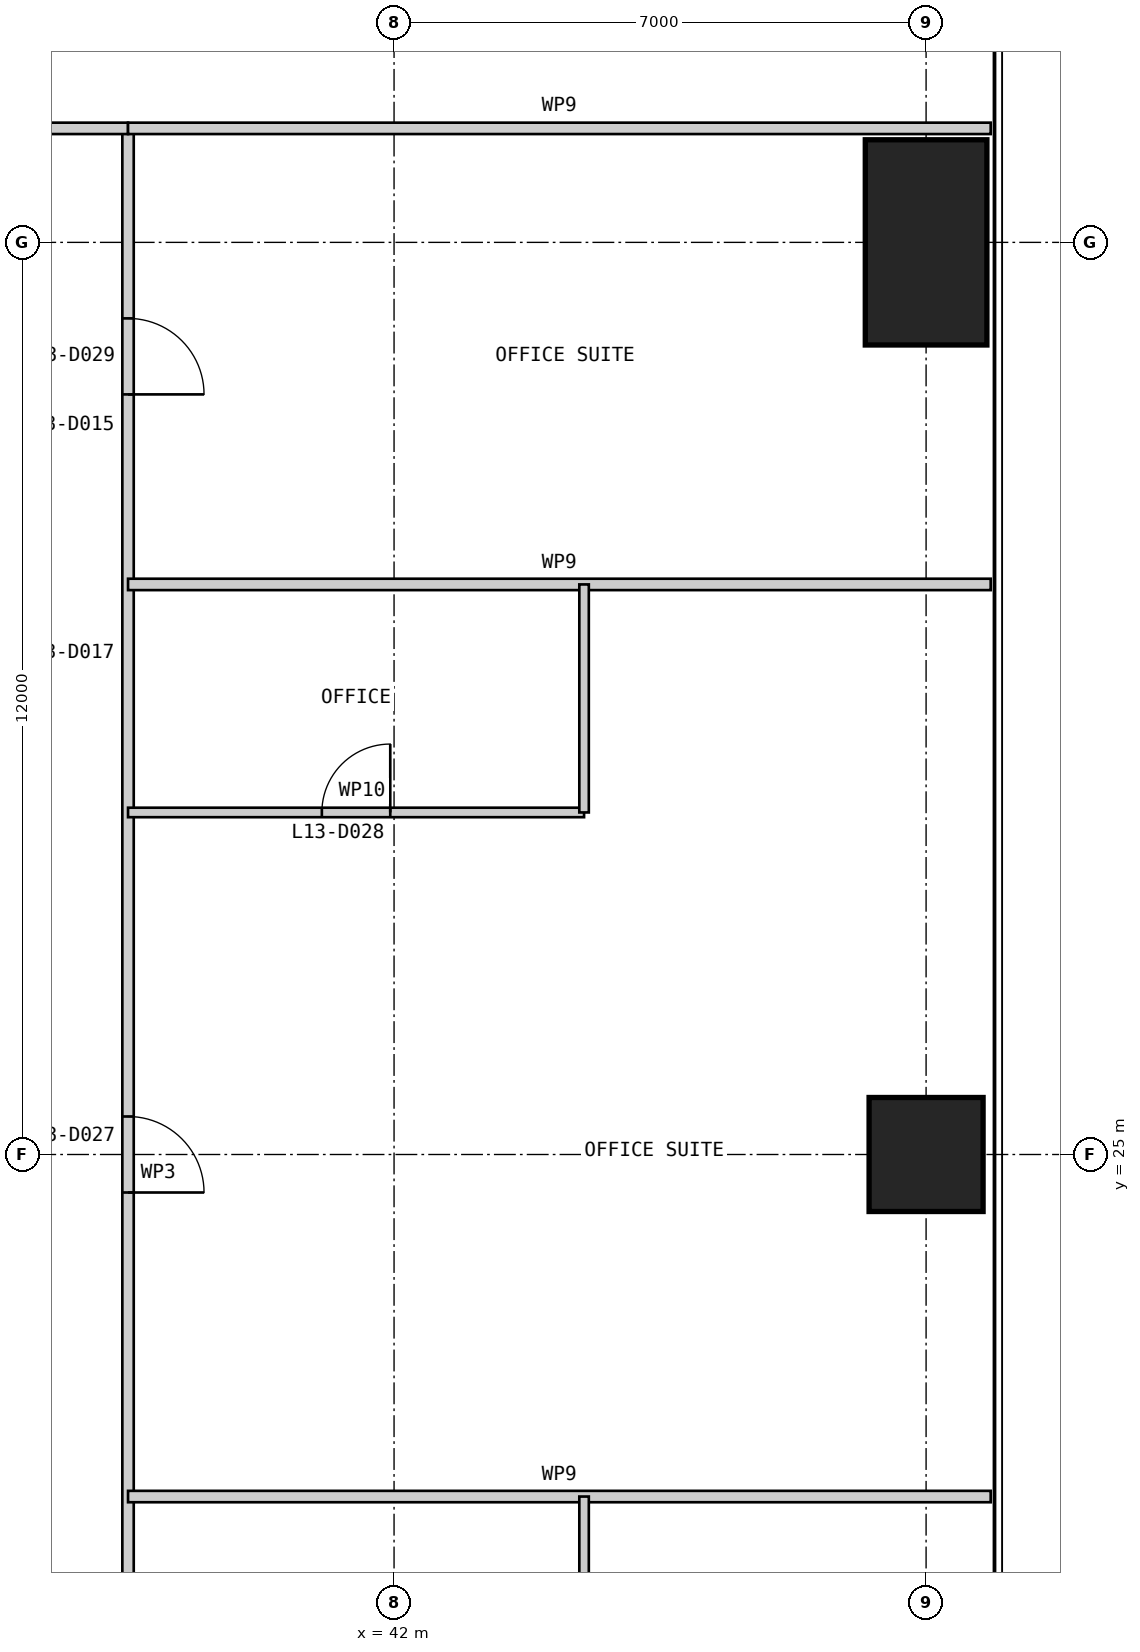
"""IFC4 building model, lengths in metres.
Left out: names, types, materials, properties, quantities, classifications, styles, units other than length and angle.
Written with IfcOpenShell. Run it as: python <this file> out.ifc"""

import sys

from ifc_helpers import new_model, si_unit, direction, frame, frame_2d, origin, origin_2d, place, context, subcontext, project, spatial, rectangle, extrude, element, fill, save


model = new_model("IFC4")
c1 = context("Model", 3, precision=1e-05, world=origin(), true_north=direction((0.0, 1.0)))
c2 = subcontext(c1, "Body", "Model", "MODEL_VIEW")
j1 = project(units=[si_unit("LENGTHUNIT", "METRE"), si_unit("PLANEANGLEUNIT", "RADIAN")], contexts=[c1])
p1 = place(None, origin())
s1 = spatial("IfcSite", under=j1, at=p1, CompositionType="ELEMENT")
p2 = place(p1, origin())
s2 = spatial("IfcBuilding", under=s1, at=p2, CompositionType="ELEMENT")
p3 = place(p2, frame((0.0, 0.0, 59.0)))
s3 = spatial("IfcBuildingStorey", under=s2, at=p3, CompositionType="ELEMENT", Elevation=59.0)
p4 = place(p3, frame((49.0, 25.0, 0.0), z_axis=(0.0, 0.0, 1.0), x_axis=(1.0, 0.0, 0.0)))
e1 = element("IfcColumn", 1, at=p4, inside=s3, PredefinedType="COLUMN", context=c2, shape_type="SweptSolid", body=[
    extrude(rectangle(XDim=1.5, YDim=1.5, at=origin_2d()), origin(), (0.0, 0.0, 1.0), 4.0),
])
p5 = place(p3, frame((49.0, 37.0, 0.0), z_axis=(0.0, 0.0, 1.0), x_axis=(1.0, 0.0, 0.0)))
e2 = element("IfcColumn", 2, at=p5, inside=s3, PredefinedType="COLUMN", context=c2, shape_type="SweptSolid", body=[
    extrude(rectangle(XDim=1.6, YDim=2.7, at=origin_2d()), origin(), (0.0, 0.0, 1.0), 4.0),
])
p6 = place(p3, frame((38.5, 11.5, 0.0), z_axis=(0.0, 0.0, 1.0), x_axis=(0.0, 1.0, 0.0)))
e3 = element("IfcWall", 3, at=p6, inside=s3, PredefinedType="PARTITIONING", context=c2, shape_type="SweptSolid", body=[
    extrude(rectangle(XDim=27.0, YDim=0.15, at=frame_2d((13.5, 0.0))), origin(), (0.0, 0.0, 1.0), 3.85),
])
p7 = place(p6, frame((2.5, 0.0, 0.0)))
e4 = element("IfcOpeningElement", 4, at=p7, cuts=e3, PredefinedType="OPENING", context=c2, shape_type="SweptSolid", body=[
    extrude(rectangle(XDim=1.0, YDim=2.2, at=frame_2d((0.5, 1.1))), frame((0.0, 0.085, 0.0), z_axis=(0.0, -1.0, 0.0), x_axis=(1.0, 0.0, 0.0)), (0.0, 0.0, 1.0), 0.17),
])
p8 = place(p6, frame((13.0, 0.0, 0.0)))
e5 = element("IfcOpeningElement", 5, at=p8, cuts=e3, PredefinedType="OPENING", context=c2, shape_type="SweptSolid", body=[
    extrude(rectangle(XDim=1.0, YDim=2.2, at=frame_2d((0.5, 1.1))), frame((0.0, 0.085, 0.0), z_axis=(0.0, -1.0, 0.0), x_axis=(1.0, 0.0, 0.0)), (0.0, 0.0, 1.0), 0.17),
])
p9 = place(p6, frame((23.5, 0.0, 0.0)))
e6 = element("IfcOpeningElement", 6, at=p9, cuts=e3, PredefinedType="OPENING", context=c2, shape_type="SweptSolid", body=[
    extrude(rectangle(XDim=1.0, YDim=2.2, at=frame_2d((0.5, 1.1))), frame((0.0, 0.085, 0.0), z_axis=(0.0, -1.0, 0.0), x_axis=(1.0, 0.0, 0.0)), (0.0, 0.0, 1.0), 0.17),
])
p10 = place(p3, frame((49.85, 20.5, 0.0), z_axis=(0.0, 0.0, 1.0), x_axis=(-1.0, 0.0, 0.0)))
e7 = element("IfcWall", 7, at=p10, inside=s3, PredefinedType="PARTITIONING", context=c2, shape_type="SweptSolid", body=[
    extrude(rectangle(XDim=11.35, YDim=0.15, at=frame_2d((5.675, 0.0))), origin(), (0.0, 0.0, 1.0), 3.85),
])
p11 = place(p3, frame((44.5, 29.5, 0.0), z_axis=(0.0, 0.0, 1.0), x_axis=(-1.0, 0.0, 0.0)))
e8 = element("IfcWall", 8, at=p11, inside=s3, PredefinedType="PARTITIONING", context=c2, shape_type="SweptSolid", body=[
    extrude(rectangle(XDim=6.0, YDim=0.125, at=frame_2d((3.0, 0.0))), origin(), (0.0, 0.0, 1.0), 3.85),
])
p12 = place(p11, frame((2.55, 0.0, 0.0)))
e9 = element("IfcOpeningElement", 9, at=p12, cuts=e8, PredefinedType="OPENING", context=c2, shape_type="SweptSolid", body=[
    extrude(rectangle(XDim=0.9, YDim=2.2, at=frame_2d((0.45, 1.1))), frame((0.0, 0.073, 0.0), z_axis=(0.0, -1.0, 0.0), x_axis=(1.0, 0.0, 0.0)), (0.0, 0.0, 1.0), 0.145),
])
p13 = place(p3, frame((49.85, 32.5, 0.0), z_axis=(0.0, 0.0, 1.0), x_axis=(-1.0, 0.0, 0.0)))
e10 = element("IfcWall", 10, at=p13, inside=s3, PredefinedType="PARTITIONING", context=c2, shape_type="SweptSolid", body=[
    extrude(rectangle(XDim=11.35, YDim=0.15, at=frame_2d((5.675, 0.0))), origin(), (0.0, 0.0, 1.0), 3.85),
])
p14 = place(p3, frame((44.5, 14.5, 0.0), z_axis=(0.0, 0.0, 1.0), x_axis=(0.0, 1.0, 0.0)))
e11 = element("IfcWall", 11, at=p14, inside=s3, PredefinedType="PARTITIONING", context=c2, shape_type="SweptSolid", body=[
    extrude(rectangle(XDim=6.0, YDim=0.125, at=frame_2d((3.0, 0.0))), origin(), (0.0, 0.0, 1.0), 3.85),
])
p15 = place(p3, frame((44.5, 29.5, 0.0), z_axis=(0.0, 0.0, 1.0), x_axis=(0.0, 1.0, 0.0)))
e12 = element("IfcWall", 12, at=p15, inside=s3, PredefinedType="PARTITIONING", context=c2, shape_type="SweptSolid", body=[
    extrude(rectangle(XDim=3.0, YDim=0.125, at=frame_2d((1.5, 0.0))), origin(), (0.0, 0.0, 1.0), 3.85),
])
p16 = place(p3, frame((38.5, 38.5, 0.0), z_axis=(0.0, 0.0, 1.0), x_axis=(-1.0, 0.0, 0.0)))
e13 = element("IfcWall", 13, at=p16, inside=s3, PredefinedType="PARTITIONING", context=c2, shape_type="SweptSolid", body=[
    extrude(rectangle(XDim=27.0, YDim=0.15, at=frame_2d((13.5, 0.0))), origin(), (0.0, 0.0, 1.0), 3.85),
])
p17 = place(p16, frame((4.0, 0.0, 0.0)))
e14 = element("IfcOpeningElement", 14, at=p17, cuts=e13, PredefinedType="OPENING", context=c2, shape_type="SweptSolid", body=[
    extrude(rectangle(XDim=1.0, YDim=2.2, at=frame_2d((0.5, 1.1))), frame((0.0, 0.085, 0.0), z_axis=(0.0, -1.0, 0.0), x_axis=(1.0, 0.0, 0.0)), (0.0, 0.0, 1.0), 0.17),
])
p18 = place(p16, frame((10.0, 0.0, 0.0)))
e15 = element("IfcOpeningElement", 15, at=p18, cuts=e13, PredefinedType="OPENING", context=c2, shape_type="SweptSolid", body=[
    extrude(rectangle(XDim=1.0, YDim=2.2, at=frame_2d((0.5, 1.1))), frame((0.0, 0.085, 0.0), z_axis=(0.0, -1.0, 0.0), x_axis=(1.0, 0.0, 0.0)), (0.0, 0.0, 1.0), 0.17),
])
p19 = place(p16, frame((17.5, 0.0, 0.0)))
e16 = element("IfcOpeningElement", 16, at=p19, cuts=e13, PredefinedType="OPENING", context=c2, shape_type="SweptSolid", body=[
    extrude(rectangle(XDim=1.0, YDim=2.2, at=frame_2d((0.5, 1.1))), frame((0.0, 0.085, 0.0), z_axis=(0.0, -1.0, 0.0), x_axis=(1.0, 0.0, 0.0)), (0.0, 0.0, 1.0), 0.17),
])
p20 = place(p16, frame((23.5, 0.0, 0.0)))
e17 = element("IfcOpeningElement", 17, at=p20, cuts=e13, PredefinedType="OPENING", context=c2, shape_type="SweptSolid", body=[
    extrude(rectangle(XDim=1.0, YDim=2.2, at=frame_2d((0.5, 1.1))), frame((0.0, 0.085, 0.0), z_axis=(0.0, -1.0, 0.0), x_axis=(1.0, 0.0, 0.0)), (0.0, 0.0, 1.0), 0.17),
])
p21 = place(p3, frame((49.85, 38.5, 0.0), z_axis=(0.0, 0.0, 1.0), x_axis=(-1.0, 0.0, 0.0)))
e18 = element("IfcWall", 18, at=p21, inside=s3, PredefinedType="PARTITIONING", context=c2, shape_type="SweptSolid", body=[
    extrude(rectangle(XDim=11.35, YDim=0.15, at=frame_2d((5.675, 0.0))), origin(), (0.0, 0.0, 1.0), 3.85),
])
p22 = place(p8, frame((1.0, 0.0, 0.0), z_axis=(0.0, 0.0, 1.0), x_axis=(-1.0, 0.0, 0.0)))
e19 = element("IfcDoor", 19, at=p22, inside=s3, OperationType="SINGLE_SWING_RIGHT", PredefinedType="DOOR", context=c2, shape_type="SweptSolid", body=[
    extrude(rectangle(XDim=1.0, YDim=2.2, at=frame_2d((0.5, 1.1))), frame((0.0, 0.025, 0.0), z_axis=(0.0, -1.0, 0.0), x_axis=(1.0, 0.0, 0.0)), (0.0, 0.0, 1.0), 0.05),
])
fill(e5, e19)
p23 = place(p12, frame((0.9, 0.0, 0.0), z_axis=(0.0, 0.0, 1.0), x_axis=(-1.0, 0.0, 0.0)))
e20 = element("IfcDoor", 20, at=p23, inside=s3, OperationType="SINGLE_SWING_RIGHT", PredefinedType="DOOR", context=c2, shape_type="SweptSolid", body=[
    extrude(rectangle(XDim=0.9, YDim=2.2, at=frame_2d((0.45, 1.1))), frame((0.0, 0.025, 0.0), z_axis=(0.0, -1.0, 0.0), x_axis=(1.0, 0.0, 0.0)), (0.0, 0.0, 1.0), 0.05),
])
fill(e9, e20)
p24 = place(p9, frame((1.0, 0.0, 0.0), z_axis=(0.0, 0.0, 1.0), x_axis=(-1.0, 0.0, 0.0)))
e21 = element("IfcDoor", 21, at=p24, inside=s3, OperationType="SINGLE_SWING_RIGHT", PredefinedType="DOOR", context=c2, shape_type="SweptSolid", body=[
    extrude(rectangle(XDim=1.0, YDim=2.2, at=frame_2d((0.5, 1.1))), frame((0.0, 0.025, 0.0), z_axis=(0.0, -1.0, 0.0), x_axis=(1.0, 0.0, 0.0)), (0.0, 0.0, 1.0), 0.05),
])
fill(e6, e21)
save(model, sys.argv[1])
